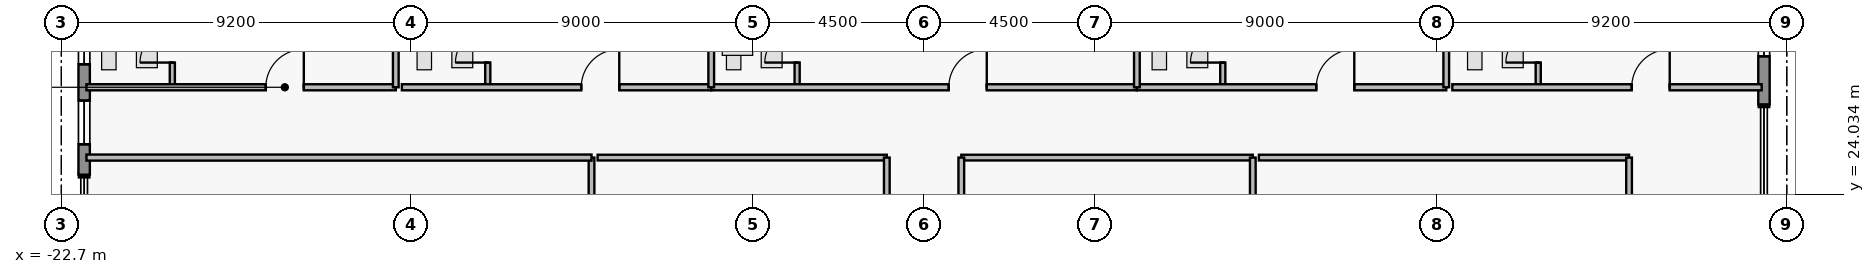
"""IFC4 building model, lengths in metres.
Left out: names, types, materials, properties, quantities, classifications, styles, units other than length and angle.
Written with IfcOpenShell. Run it as: python <this file> out.ifc"""

import sys

from ifc_helpers import new_model, si_unit, direction, frame, frame_2d, origin, place, context, subcontext, project, spatial, rectangle, extrude, element, fill, save


model = new_model("IFC4")
c1 = context("Model", 3, precision=1e-05, world=origin(), true_north=direction((0.0, 1.0)))
c2 = subcontext(c1, "Body", "Model", "MODEL_VIEW")
j1 = project(units=[si_unit("LENGTHUNIT", "METRE"), si_unit("PLANEANGLEUNIT", "RADIAN")], contexts=[c1])
p1 = place(None, origin())
s1 = spatial("IfcSite", under=j1, at=p1, CompositionType="ELEMENT")
p2 = place(p1, origin())
s2 = spatial("IfcBuilding", under=s1, at=p2, CompositionType="ELEMENT")
p3 = place(p2, frame((0.0, 0.0, 192.4)))
s3 = spatial("IfcBuildingStorey", under=s2, at=p3, CompositionType="ELEMENT", Elevation=192.4)
p4 = place(p3, frame((-22.1, 24.55, 0.0), z_axis=(0.0, 0.0, 1.0), x_axis=(0.0, 1.0, 0.0)))
e1 = element("IfcWall", 1, at=p4, inside=s3, PredefinedType="STANDARD", context=c2, shape_type="SweptSolid", body=[
    extrude(rectangle(XDim=5.65, YDim=0.3, at=frame_2d((2.825, 0.0))), origin(), (0.0, 0.0, 1.0), 3.53),
])
p5 = place(p4, frame((0.8, 0.0, 0.95)))
e2 = element("IfcOpeningElement", 2, at=p5, cuts=e1, PredefinedType="OPENING", context=c2, shape_type="SweptSolid", body=[
    extrude(rectangle(XDim=1.15, YDim=1.55, at=frame_2d((0.575, 0.775))), frame((0.0, 0.16, 0.0), z_axis=(0.0, -1.0, 0.0), x_axis=(1.0, 0.0, 0.0)), (0.0, 0.0, 1.0), 0.32),
])
p6 = place(p4, frame((2.905, 0.0, 0.95)))
e3 = element("IfcOpeningElement", 3, at=p6, cuts=e1, PredefinedType="OPENING", context=c2, shape_type="SweptSolid", body=[
    extrude(rectangle(XDim=1.15, YDim=1.55, at=frame_2d((0.575, 0.775))), frame((0.0, 0.16, 0.0), z_axis=(0.0, -1.0, 0.0), x_axis=(1.0, 0.0, 0.0)), (0.0, 0.0, 1.0), 0.32),
])
p7 = place(p3, frame((22.1, 30.2, 0.0), z_axis=(0.0, 0.0, 1.0), x_axis=(0.0, -1.0, 0.0)))
e4 = element("IfcWall", 4, at=p7, inside=s3, PredefinedType="STANDARD", context=c2, shape_type="SweptSolid", body=[
    extrude(rectangle(XDim=3.8, YDim=0.3, at=frame_2d((1.9, 0.0))), origin(), (0.0, 0.0, 1.0), 3.53),
])
p8 = place(p7, frame((0.935, 0.0, 0.85)))
e5 = element("IfcOpeningElement", 5, at=p8, cuts=e4, PredefinedType="OPENING", context=c2, shape_type="SweptSolid", body=[
    extrude(rectangle(XDim=1.6, YDim=1.8, at=frame_2d((0.8, 0.9))), frame((0.0, 0.16, 0.0), z_axis=(0.0, -1.0, 0.0), x_axis=(1.0, 0.0, 0.0)), (0.0, 0.0, 1.0), 0.32),
])
p9 = place(p3, frame((-19.78, 26.85, 0.0), z_axis=(0.0, 0.0, 1.0), x_axis=(0.0, 1.0, 0.0)))
e6 = element("IfcWall", 6, at=p9, inside=s3, PredefinedType="PLUMBINGWALL", context=c2, shape_type="SweptSolid", body=[
    extrude(rectangle(XDim=2.36, YDim=0.135, at=frame_2d((1.18, 0.0))), origin(), (0.0, 0.0, 1.0), 3.53),
])
p10 = place(p9, frame((0.65, 0.0, 0.0)))
e7 = element("IfcOpeningElement", 7, at=p10, cuts=e6, PredefinedType="OPENING", context=c2, shape_type="SweptSolid", body=[
    extrude(rectangle(XDim=0.85, YDim=2.1, at=frame_2d((0.425, 1.05))), frame((0.0, 0.077, 0.0), z_axis=(0.0, -1.0, 0.0), x_axis=(1.0, 0.0, 0.0)), (0.0, 0.0, 1.0), 0.155),
])
p11 = place(p3, frame((-22.04, 26.85, 0.0), z_axis=(0.0, 0.0, 1.0), x_axis=(1.0, 0.0, 0.0)))
e8 = element("IfcWall", 8, at=p11, inside=s3, PredefinedType="PARTITIONING", context=c2, shape_type="SweptSolid", body=[
    extrude(rectangle(XDim=8.14, YDim=0.16, at=frame_2d((4.07, 0.0))), origin(), (0.0, 0.0, 1.0), 3.53),
])
p12 = place(p11, frame((4.72, 0.0, 0.0)))
e9 = element("IfcOpeningElement", 9, at=p12, cuts=e8, PredefinedType="OPENING", context=c2, shape_type="SweptSolid", body=[
    extrude(rectangle(XDim=1.0, YDim=2.15, at=frame_2d((0.5, 1.075))), frame((0.0, 0.09, 0.0), z_axis=(0.0, -1.0, 0.0), x_axis=(1.0, 0.0, 0.0)), (0.0, 0.0, 1.0), 0.18),
])
p13 = place(p3, frame((-11.48, 26.85, 0.0), z_axis=(0.0, 0.0, 1.0), x_axis=(0.0, 1.0, 0.0)))
e10 = element("IfcWall", 10, at=p13, inside=s3, PredefinedType="PLUMBINGWALL", context=c2, shape_type="SweptSolid", body=[
    extrude(rectangle(XDim=2.36, YDim=0.135, at=frame_2d((1.18, 0.0))), origin(), (0.0, 0.0, 1.0), 3.53),
])
p14 = place(p13, frame((0.65, 0.0, 0.0)))
e11 = element("IfcOpeningElement", 11, at=p14, cuts=e10, PredefinedType="OPENING", context=c2, shape_type="SweptSolid", body=[
    extrude(rectangle(XDim=0.85, YDim=2.1, at=frame_2d((0.425, 1.05))), frame((0.0, 0.077, 0.0), z_axis=(0.0, -1.0, 0.0), x_axis=(1.0, 0.0, 0.0)), (0.0, 0.0, 1.0), 0.155),
])
p15 = place(p3, frame((-13.74, 26.85, 0.0), z_axis=(0.0, 0.0, 1.0), x_axis=(1.0, 0.0, 0.0)))
e12 = element("IfcWall", 12, at=p15, inside=s3, PredefinedType="PARTITIONING", context=c2, shape_type="SweptSolid", body=[
    extrude(rectangle(XDim=8.14, YDim=0.16, at=frame_2d((4.07, 0.0))), origin(), (0.0, 0.0, 1.0), 3.53),
])
p16 = place(p15, frame((4.72, 0.0, 0.0)))
e13 = element("IfcOpeningElement", 13, at=p16, cuts=e12, PredefinedType="OPENING", context=c2, shape_type="SweptSolid", body=[
    extrude(rectangle(XDim=1.0, YDim=2.15, at=frame_2d((0.5, 1.075))), frame((0.0, 0.09, 0.0), z_axis=(0.0, -1.0, 0.0), x_axis=(1.0, 0.0, 0.0)), (0.0, 0.0, 1.0), 0.18),
])
p17 = place(p3, frame((-3.34, 26.85, 0.0), z_axis=(0.0, 0.0, 1.0), x_axis=(0.0, 1.0, 0.0)))
e14 = element("IfcWall", 14, at=p17, inside=s3, PredefinedType="PLUMBINGWALL", context=c2, shape_type="SweptSolid", body=[
    extrude(rectangle(XDim=2.36, YDim=0.135, at=frame_2d((1.18, 0.0))), origin(), (0.0, 0.0, 1.0), 3.53),
])
p18 = place(p17, frame((0.65, 0.0, 0.0)))
e15 = element("IfcOpeningElement", 15, at=p18, cuts=e14, PredefinedType="OPENING", context=c2, shape_type="SweptSolid", body=[
    extrude(rectangle(XDim=0.85, YDim=2.1, at=frame_2d((0.425, 1.05))), frame((0.0, 0.077, 0.0), z_axis=(0.0, -1.0, 0.0), x_axis=(1.0, 0.0, 0.0)), (0.0, 0.0, 1.0), 0.155),
])
p19 = place(p3, frame((-5.6, 26.85, 0.0), z_axis=(0.0, 0.0, 1.0), x_axis=(1.0, 0.0, 0.0)))
e16 = element("IfcWall", 16, at=p19, inside=s3, PredefinedType="PARTITIONING", context=c2, shape_type="SweptSolid", body=[
    extrude(rectangle(XDim=11.2, YDim=0.16, at=frame_2d((5.6, 0.0))), origin(), (0.0, 0.0, 1.0), 3.53),
])
p20 = place(p19, frame((6.25, 0.0, 0.0)))
e17 = element("IfcOpeningElement", 17, at=p20, cuts=e16, PredefinedType="OPENING", context=c2, shape_type="SweptSolid", body=[
    extrude(rectangle(XDim=1.0, YDim=2.15, at=frame_2d((0.5, 1.075))), frame((0.0, 0.09, 0.0), z_axis=(0.0, -1.0, 0.0), x_axis=(1.0, 0.0, 0.0)), (0.0, 0.0, 1.0), 0.18),
])
p21 = place(p3, frame((7.86, 26.85, 0.0), z_axis=(0.0, 0.0, 1.0), x_axis=(0.0, 1.0, 0.0)))
e18 = element("IfcWall", 18, at=p21, inside=s3, PredefinedType="PLUMBINGWALL", context=c2, shape_type="SweptSolid", body=[
    extrude(rectangle(XDim=2.36, YDim=0.135, at=frame_2d((1.18, 0.0))), origin(), (0.0, 0.0, 1.0), 3.53),
])
p22 = place(p21, frame((0.65, 0.0, 0.0)))
e19 = element("IfcOpeningElement", 19, at=p22, cuts=e18, PredefinedType="OPENING", context=c2, shape_type="SweptSolid", body=[
    extrude(rectangle(XDim=0.85, YDim=2.1, at=frame_2d((0.425, 1.05))), frame((0.0, 0.077, 0.0), z_axis=(0.0, -1.0, 0.0), x_axis=(1.0, 0.0, 0.0)), (0.0, 0.0, 1.0), 0.155),
])
p23 = place(p3, frame((5.6, 26.85, 0.0), z_axis=(0.0, 0.0, 1.0), x_axis=(1.0, 0.0, 0.0)))
e20 = element("IfcWall", 20, at=p23, inside=s3, PredefinedType="PARTITIONING", context=c2, shape_type="SweptSolid", body=[
    extrude(rectangle(XDim=8.14, YDim=0.16, at=frame_2d((4.07, 0.0))), origin(), (0.0, 0.0, 1.0), 3.53),
])
p24 = place(p23, frame((4.72, 0.0, 0.0)))
e21 = element("IfcOpeningElement", 21, at=p24, cuts=e20, PredefinedType="OPENING", context=c2, shape_type="SweptSolid", body=[
    extrude(rectangle(XDim=1.0, YDim=2.15, at=frame_2d((0.5, 1.075))), frame((0.0, 0.09, 0.0), z_axis=(0.0, -1.0, 0.0), x_axis=(1.0, 0.0, 0.0)), (0.0, 0.0, 1.0), 0.18),
])
p25 = place(p3, frame((16.16, 26.85, 0.0), z_axis=(0.0, 0.0, 1.0), x_axis=(0.0, 1.0, 0.0)))
e22 = element("IfcWall", 22, at=p25, inside=s3, PredefinedType="PLUMBINGWALL", context=c2, shape_type="SweptSolid", body=[
    extrude(rectangle(XDim=2.36, YDim=0.135, at=frame_2d((1.18, 0.0))), origin(), (0.0, 0.0, 1.0), 3.53),
])
p26 = place(p25, frame((0.65, 0.0, 0.0)))
e23 = element("IfcOpeningElement", 23, at=p26, cuts=e22, PredefinedType="OPENING", context=c2, shape_type="SweptSolid", body=[
    extrude(rectangle(XDim=0.85, YDim=2.1, at=frame_2d((0.425, 1.05))), frame((0.0, 0.077, 0.0), z_axis=(0.0, -1.0, 0.0), x_axis=(1.0, 0.0, 0.0)), (0.0, 0.0, 1.0), 0.155),
])
p27 = place(p3, frame((13.9, 26.85, 0.0), z_axis=(0.0, 0.0, 1.0), x_axis=(1.0, 0.0, 0.0)))
e24 = element("IfcWall", 24, at=p27, inside=s3, PredefinedType="PARTITIONING", context=c2, shape_type="SweptSolid", body=[
    extrude(rectangle(XDim=8.14, YDim=0.16, at=frame_2d((4.07, 0.0))), origin(), (0.0, 0.0, 1.0), 3.53),
])
p28 = place(p27, frame((4.72, 0.0, 0.0)))
e25 = element("IfcOpeningElement", 25, at=p28, cuts=e24, PredefinedType="OPENING", context=c2, shape_type="SweptSolid", body=[
    extrude(rectangle(XDim=1.0, YDim=2.15, at=frame_2d((0.5, 1.075))), frame((0.0, 0.09, 0.0), z_axis=(0.0, -1.0, 0.0), x_axis=(1.0, 0.0, 0.0)), (0.0, 0.0, 1.0), 0.18),
])
p29 = place(p3, frame((-13.9, 26.85, 0.0), z_axis=(0.0, 0.0, 1.0), x_axis=(0.0, 1.0, 0.0)))
e26 = element("IfcWall", 26, at=p29, inside=s3, PredefinedType="PARTITIONING", context=c2, shape_type="SweptSolid", body=[
    extrude(rectangle(XDim=6.67, YDim=0.15, at=frame_2d((3.335, 0.0))), origin(), (0.0, 0.0, 1.0), 2.519),
])
for number, where, z_axis, x_axis in (
    (27, (-5.6, 26.85, 0.0), (0.0, 0.0, 1.0), (0.0, 1.0, 0.0)),
    (28, (5.6, 26.85, 0.0), (0.0, 0.0, 1.0), (0.0, 1.0, 0.0)),
):
    element("IfcWall", number, at=place(p3, frame(where, z_axis=z_axis, x_axis=x_axis)), inside=s3, PredefinedType="PARTITIONING", context=c2, shape_type="SweptSolid", body=[
        extrude(rectangle(XDim=6.67, YDim=0.15, at=frame_2d((3.335, 0.0))), origin(), (0.0, 0.0, 1.0), 3.53),
    ])
p30 = place(p3, frame((13.74, 26.85, 0.0), z_axis=(0.0, 0.0, 1.0), x_axis=(0.0, 1.0, 0.0)))
e29 = element("IfcWall", 29, at=p30, inside=s3, PredefinedType="PARTITIONING", context=c2, shape_type="SweptSolid", body=[
    extrude(rectangle(XDim=6.67, YDim=0.15, at=frame_2d((3.335, 0.0))), origin(), (0.0, 0.0, 1.0), 2.519),
])
p31 = place(p3, frame((-8.75, 16.7, 0.0), z_axis=(0.0, 0.0, 1.0), x_axis=(0.0, 1.0, 0.0)))
e30 = element("IfcWall", 30, at=p31, inside=s3, PredefinedType="PARTITIONING", context=c2, shape_type="SweptSolid", body=[
    extrude(rectangle(XDim=8.3, YDim=0.15, at=frame_2d((4.15, 0.0))), origin(), (0.0, 0.0, 1.0), 3.53),
])
p32 = place(p3, frame((-22.04, 25.0, 0.0), z_axis=(0.0, 0.0, 1.0), x_axis=(1.0, 0.0, 0.0)))
e31 = element("IfcWall", 31, at=p32, inside=s3, PredefinedType="PARTITIONING", context=c2, shape_type="SweptSolid", body=[
    extrude(rectangle(XDim=13.29, YDim=0.16, at=frame_2d((6.645, 0.0))), origin(), (0.0, 0.0, 1.0), 3.124),
])
p33 = place(p3, frame((-8.59, 25.0, 0.0), z_axis=(0.0, 0.0, 1.0), x_axis=(1.0, 0.0, 0.0)))
e32 = element("IfcWall", 32, at=p33, inside=s3, PredefinedType="PARTITIONING", context=c2, shape_type="SweptSolid", body=[
    extrude(rectangle(XDim=7.61, YDim=0.15, at=frame_2d((3.805, 0.0))), origin(), (0.0, 0.0, 1.0), 3.124),
])
p34 = place(p3, frame((-0.98, 16.7, 0.0), z_axis=(0.0, 0.0, 1.0), x_axis=(0.0, 1.0, 0.0)))
e33 = element("IfcWall", 33, at=p34, inside=s3, PredefinedType="PARTITIONING", context=c2, shape_type="SweptSolid", body=[
    extrude(rectangle(XDim=8.3, YDim=0.15, at=frame_2d((4.15, 0.0))), origin(), (0.0, 0.0, 1.0), 3.53),
])
p35 = place(p3, frame((0.98, 25.0, 0.0), z_axis=(0.0, 0.0, 1.0), x_axis=(1.0, 0.0, 0.0)))
e34 = element("IfcWall", 34, at=p35, inside=s3, PredefinedType="PARTITIONING", context=c2, shape_type="SweptSolid", body=[
    extrude(rectangle(XDim=7.67, YDim=0.15, at=frame_2d((3.835, 0.0))), origin(), (0.0, 0.0, 1.0), 3.124),
])
for number, where, z_axis, x_axis in (
    (35, (0.98, 16.7, 0.0), (0.0, 0.0, 1.0), (0.0, 1.0, 0.0)),
    (36, (8.65, 16.7, 0.0), (0.0, 0.0, 1.0), (0.0, 1.0, 0.0)),
):
    element("IfcWall", number, at=place(p3, frame(where, z_axis=z_axis, x_axis=x_axis)), inside=s3, PredefinedType="PARTITIONING", context=c2, shape_type="SweptSolid", body=[
        extrude(rectangle(XDim=8.3, YDim=0.15, at=frame_2d((4.15, 0.0))), origin(), (0.0, 0.0, 1.0), 3.53),
    ])
p36 = place(p3, frame((8.81, 25.0, 0.0), z_axis=(0.0, 0.0, 1.0), x_axis=(1.0, 0.0, 0.0)))
e37 = element("IfcWall", 37, at=p36, inside=s3, PredefinedType="PARTITIONING", context=c2, shape_type="SweptSolid", body=[
    extrude(rectangle(XDim=9.74, YDim=0.15, at=frame_2d((4.87, 0.0))), origin(), (0.0, 0.0, 1.0), 3.124),
])
p37 = place(p3, frame((18.55, 16.7, 0.0), z_axis=(0.0, 0.0, 1.0), x_axis=(0.0, 1.0, 0.0)))
e38 = element("IfcWall", 38, at=p37, inside=s3, PredefinedType="PARTITIONING", context=c2, shape_type="SweptSolid", body=[
    extrude(rectangle(XDim=8.3, YDim=0.15, at=frame_2d((4.15, 0.0))), origin(), (0.0, 0.0, 1.0), 3.53),
])
p38 = place(p5, origin())
e39 = element("IfcWindow", 39, at=p38, inside=s3, PartitioningType="SINGLE_PANEL", PredefinedType="WINDOW", context=c2, shape_type="SweptSolid", body=[
    extrude(rectangle(XDim=1.15, YDim=1.55, at=frame_2d((0.575, 0.775))), frame((0.0, 0.03, 0.0), z_axis=(0.0, -1.0, 0.0), x_axis=(1.0, 0.0, 0.0)), (0.0, 0.0, 1.0), 0.06),
])
fill(e2, e39)
p39 = place(p6, origin())
e40 = element("IfcWindow", 40, at=p39, inside=s3, PartitioningType="SINGLE_PANEL", PredefinedType="WINDOW", context=c2, shape_type="SweptSolid", body=[
    extrude(rectangle(XDim=1.15, YDim=1.55, at=frame_2d((0.575, 0.775))), frame((0.0, 0.03, 0.0), z_axis=(0.0, -1.0, 0.0), x_axis=(1.0, 0.0, 0.0)), (0.0, 0.0, 1.0), 0.06),
])
fill(e3, e40)
p40 = place(p8, origin())
e41 = element("IfcWindow", 41, at=p40, inside=s3, PartitioningType="SINGLE_PANEL", PredefinedType="WINDOW", context=c2, shape_type="SweptSolid", body=[
    extrude(rectangle(XDim=1.6, YDim=1.8, at=frame_2d((0.8, 0.9))), frame((0.0, 0.03, 0.0), z_axis=(0.0, -1.0, 0.0), x_axis=(1.0, 0.0, 0.0)), (0.0, 0.0, 1.0), 0.06),
])
fill(e5, e41)
p41 = place(p10, origin())
e42 = element("IfcDoor", 42, at=p41, inside=s3, OperationType="SINGLE_SWING_LEFT", PredefinedType="DOOR", context=c2, shape_type="SweptSolid", body=[
    extrude(rectangle(XDim=0.85, YDim=2.1, at=frame_2d((0.425, 1.05))), frame((0.0, 0.025, 0.0), z_axis=(0.0, -1.0, 0.0), x_axis=(1.0, 0.0, 0.0)), (0.0, 0.0, 1.0), 0.05),
])
fill(e7, e42)
p42 = place(p12, origin())
e43 = element("IfcDoor", 43, at=p42, inside=s3, OperationType="SINGLE_SWING_RIGHT", PredefinedType="DOOR", context=c2, shape_type="SweptSolid", body=[
    extrude(rectangle(XDim=1.0, YDim=2.15, at=frame_2d((0.5, 1.075))), frame((0.0, 0.025, 0.0), z_axis=(0.0, -1.0, 0.0), x_axis=(1.0, 0.0, 0.0)), (0.0, 0.0, 1.0), 0.05),
])
fill(e9, e43)
p43 = place(p14, origin())
e44 = element("IfcDoor", 44, at=p43, inside=s3, OperationType="SINGLE_SWING_LEFT", PredefinedType="DOOR", context=c2, shape_type="SweptSolid", body=[
    extrude(rectangle(XDim=0.85, YDim=2.1, at=frame_2d((0.425, 1.05))), frame((0.0, 0.025, 0.0), z_axis=(0.0, -1.0, 0.0), x_axis=(1.0, 0.0, 0.0)), (0.0, 0.0, 1.0), 0.05),
])
fill(e11, e44)
p44 = place(p16, origin())
e45 = element("IfcDoor", 45, at=p44, inside=s3, OperationType="SINGLE_SWING_RIGHT", PredefinedType="DOOR", context=c2, shape_type="SweptSolid", body=[
    extrude(rectangle(XDim=1.0, YDim=2.15, at=frame_2d((0.5, 1.075))), frame((0.0, 0.025, 0.0), z_axis=(0.0, -1.0, 0.0), x_axis=(1.0, 0.0, 0.0)), (0.0, 0.0, 1.0), 0.05),
])
fill(e13, e45)
p45 = place(p18, origin())
e46 = element("IfcDoor", 46, at=p45, inside=s3, OperationType="SINGLE_SWING_LEFT", PredefinedType="DOOR", context=c2, shape_type="SweptSolid", body=[
    extrude(rectangle(XDim=0.85, YDim=2.1, at=frame_2d((0.425, 1.05))), frame((0.0, 0.025, 0.0), z_axis=(0.0, -1.0, 0.0), x_axis=(1.0, 0.0, 0.0)), (0.0, 0.0, 1.0), 0.05),
])
fill(e15, e46)
p46 = place(p20, origin())
e47 = element("IfcDoor", 47, at=p46, inside=s3, OperationType="SINGLE_SWING_RIGHT", PredefinedType="DOOR", context=c2, shape_type="SweptSolid", body=[
    extrude(rectangle(XDim=1.0, YDim=2.15, at=frame_2d((0.5, 1.075))), frame((0.0, 0.025, 0.0), z_axis=(0.0, -1.0, 0.0), x_axis=(1.0, 0.0, 0.0)), (0.0, 0.0, 1.0), 0.05),
])
fill(e17, e47)
p47 = place(p22, origin())
e48 = element("IfcDoor", 48, at=p47, inside=s3, OperationType="SINGLE_SWING_LEFT", PredefinedType="DOOR", context=c2, shape_type="SweptSolid", body=[
    extrude(rectangle(XDim=0.85, YDim=2.1, at=frame_2d((0.425, 1.05))), frame((0.0, 0.025, 0.0), z_axis=(0.0, -1.0, 0.0), x_axis=(1.0, 0.0, 0.0)), (0.0, 0.0, 1.0), 0.05),
])
fill(e19, e48)
p48 = place(p24, origin())
e49 = element("IfcDoor", 49, at=p48, inside=s3, OperationType="SINGLE_SWING_RIGHT", PredefinedType="DOOR", context=c2, shape_type="SweptSolid", body=[
    extrude(rectangle(XDim=1.0, YDim=2.15, at=frame_2d((0.5, 1.075))), frame((0.0, 0.025, 0.0), z_axis=(0.0, -1.0, 0.0), x_axis=(1.0, 0.0, 0.0)), (0.0, 0.0, 1.0), 0.05),
])
fill(e21, e49)
p49 = place(p26, origin())
e50 = element("IfcDoor", 50, at=p49, inside=s3, OperationType="SINGLE_SWING_LEFT", PredefinedType="DOOR", context=c2, shape_type="SweptSolid", body=[
    extrude(rectangle(XDim=0.85, YDim=2.1, at=frame_2d((0.425, 1.05))), frame((0.0, 0.025, 0.0), z_axis=(0.0, -1.0, 0.0), x_axis=(1.0, 0.0, 0.0)), (0.0, 0.0, 1.0), 0.05),
])
fill(e23, e50)
p50 = place(p28, origin())
e51 = element("IfcDoor", 51, at=p50, inside=s3, OperationType="SINGLE_SWING_RIGHT", PredefinedType="DOOR", context=c2, shape_type="SweptSolid", body=[
    extrude(rectangle(XDim=1.0, YDim=2.15, at=frame_2d((0.5, 1.075))), frame((0.0, 0.025, 0.0), z_axis=(0.0, -1.0, 0.0), x_axis=(1.0, 0.0, 0.0)), (0.0, 0.0, 1.0), 0.05),
])
fill(e25, e51)
save(model, sys.argv[1])
